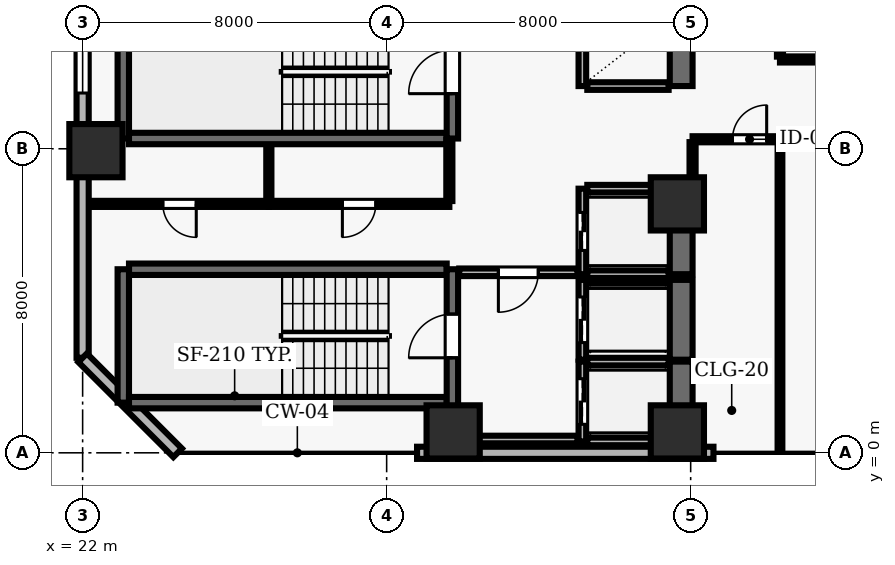
"""IFC4 building model, lengths in metres.
Left out: names, types, materials, properties, quantities, classifications, styles, units other than length and angle.
Written with IfcOpenShell. Run it as: python <this file> out.ifc"""

import sys

from ifc_helpers import new_model, si_unit, direction, frame, frame_2d, origin, origin_2d, place, context, subcontext, project, spatial, rectangle, extrude, element, fill, save


model = new_model("IFC4")
c1 = context("Model", 3, precision=1e-05, world=origin(), true_north=direction((0.0, 1.0)))
c2 = subcontext(c1, "Body", "Model", "MODEL_VIEW")
j1 = project(units=[si_unit("LENGTHUNIT", "METRE"), si_unit("PLANEANGLEUNIT", "RADIAN")], contexts=[c1])
p1 = place(None, origin())
s1 = spatial("IfcSite", under=j1, at=p1, CompositionType="ELEMENT")
p2 = place(p1, origin())
s2 = spatial("IfcBuilding", under=s1, at=p2, CompositionType="ELEMENT")
p3 = place(p2, frame((0.0, 0.0, 70.0)))
s3 = spatial("IfcBuildingStorey", under=s2, at=p3, CompositionType="ELEMENT", Elevation=70.0)
for number, where, z_axis, x_axis in (
    (1, (31.75, 0.55, 0.0), (0.0, 0.0, 1.0), (1.0, 0.0, 0.0)),
    (2, (37.65, 0.55, 0.0), (0.0, 0.0, 1.0), (1.0, 0.0, 0.0)),
    (3, (22.35, 7.95, 0.0), (0.0, 0.0, 1.0), (1.0, 0.0, 0.0)),
    (4, (37.65, 6.55, 0.0), (0.0, 0.0, 1.0), (1.0, 0.0, 0.0)),
):
    element("IfcColumn", number, at=place(p3, frame(where, z_axis=z_axis, x_axis=x_axis)), inside=s3, PredefinedType="COLUMN", context=c2, shape_type="SweptSolid", body=[
        extrude(rectangle(XDim=1.4, YDim=1.4, at=origin_2d()), origin(), (0.0, 0.0, 1.0), 3.9),
    ])
p4 = place(p3, frame((30.8, 0.0, 0.0), z_axis=(0.0, 0.0, 1.0), x_axis=(1.0, 0.0, 0.0)))
e5 = element("IfcWall", 5, at=p4, inside=s3, PredefinedType="SOLIDWALL", context=c2, shape_type="SweptSolid", body=[
    extrude(rectangle(XDim=7.8, YDim=0.32, at=frame_2d((3.9, 0.0))), origin(), (0.0, 0.0, 1.0), 3.69),
])
p5 = place(p3, frame((22.0, 51.5, 0.0), z_axis=(0.0, 0.0, 1.0), x_axis=(0.0, -1.0, 0.0)))
e6 = element("IfcWall", 6, at=p5, inside=s3, PredefinedType="SOLIDWALL", context=c2, shape_type="SweptSolid", body=[
    extrude(rectangle(XDim=49.0, YDim=0.32, at=frame_2d((24.5, 0.0))), origin(), (0.0, 0.0, 1.0), 3.69),
])
p6 = place(p5, frame((12.1, 0.0, 0.0)))
e7 = element("IfcOpeningElement", 7, at=p6, cuts=e6, PredefinedType="OPENING", context=c2, shape_type="SweptSolid", body=[
    extrude(rectangle(XDim=1.0, YDim=2.2, at=frame_2d((0.5, 1.1))), frame((0.0, 0.17, 0.0), z_axis=(0.0, -1.0, 0.0), x_axis=(1.0, 0.0, 0.0)), (0.0, 0.0, 1.0), 0.34),
])
p7 = place(p5, frame((1.522, 0.0, 0.9)))
e8 = element("IfcOpeningElement", 8, at=p7, cuts=e6, PredefinedType="OPENING", context=c2, shape_type="SweptSolid", body=[
    extrude(rectangle(XDim=2.4, YDim=1.6, at=frame_2d((1.2, 0.8))), frame((0.0, 0.17, 0.0), z_axis=(0.0, -1.0, 0.0), x_axis=(1.0, 0.0, 0.0)), (0.0, 0.0, 1.0), 0.34),
])
p8 = place(p5, frame((6.967, 0.0, 0.9)))
e9 = element("IfcOpeningElement", 9, at=p8, cuts=e6, PredefinedType="OPENING", context=c2, shape_type="SweptSolid", body=[
    extrude(rectangle(XDim=2.4, YDim=1.6, at=frame_2d((1.2, 0.8))), frame((0.0, 0.17, 0.0), z_axis=(0.0, -1.0, 0.0), x_axis=(1.0, 0.0, 0.0)), (0.0, 0.0, 1.0), 0.34),
])
p9 = place(p5, frame((17.856, 0.0, 0.9)))
e10 = element("IfcOpeningElement", 10, at=p9, cuts=e6, PredefinedType="OPENING", context=c2, shape_type="SweptSolid", body=[
    extrude(rectangle(XDim=2.4, YDim=1.6, at=frame_2d((1.2, 0.8))), frame((0.0, 0.17, 0.0), z_axis=(0.0, -1.0, 0.0), x_axis=(1.0, 0.0, 0.0)), (0.0, 0.0, 1.0), 0.34),
])
p10 = place(p5, frame((22.4, 0.0, 0.9)))
e11 = element("IfcOpeningElement", 11, at=p10, cuts=e6, PredefinedType="OPENING", context=c2, shape_type="SweptSolid", body=[
    extrude(rectangle(XDim=2.4, YDim=1.6, at=frame_2d((1.2, 0.8))), frame((0.0, 0.17, 0.0), z_axis=(0.0, -1.0, 0.0), x_axis=(1.0, 0.0, 0.0)), (0.0, 0.0, 1.0), 0.34),
])
p11 = place(p5, frame((29.194, 0.0, 0.9)))
e12 = element("IfcOpeningElement", 12, at=p11, cuts=e6, PredefinedType="OPENING", context=c2, shape_type="SweptSolid", body=[
    extrude(rectangle(XDim=2.4, YDim=1.6, at=frame_2d((1.2, 0.8))), frame((0.0, 0.17, 0.0), z_axis=(0.0, -1.0, 0.0), x_axis=(1.0, 0.0, 0.0)), (0.0, 0.0, 1.0), 0.34),
])
p12 = place(p5, frame((33.289, 0.0, 0.9)))
e13 = element("IfcOpeningElement", 13, at=p12, cuts=e6, PredefinedType="OPENING", context=c2, shape_type="SweptSolid", body=[
    extrude(rectangle(XDim=2.4, YDim=1.6, at=frame_2d((1.2, 0.8))), frame((0.0, 0.17, 0.0), z_axis=(0.0, -1.0, 0.0), x_axis=(1.0, 0.0, 0.0)), (0.0, 0.0, 1.0), 0.34),
])
p13 = place(p5, frame((39.633, 0.0, 0.9)))
e14 = element("IfcOpeningElement", 14, at=p13, cuts=e6, PredefinedType="OPENING", context=c2, shape_type="SweptSolid", body=[
    extrude(rectangle(XDim=2.4, YDim=1.6, at=frame_2d((1.2, 0.8))), frame((0.0, 0.17, 0.0), z_axis=(0.0, -1.0, 0.0), x_axis=(1.0, 0.0, 0.0)), (0.0, 0.0, 1.0), 0.34),
])
p14 = place(p3, frame((22.0, 2.5, 0.0), z_axis=(0.0, 0.0, 1.0), x_axis=(0.707106781187, -0.707106781187, 0.0)))
e15 = element("IfcWall", 15, at=p14, inside=s3, PredefinedType="SOLIDWALL", context=c2, shape_type="SweptSolid", body=[
    extrude(rectangle(XDim=3.536, YDim=0.32, at=frame_2d((1.768, 0.0))), origin(), (0.0, 0.0, 1.0), 3.69),
])
p15 = place(p3, frame((31.58, 4.83, 0.0), z_axis=(0.0, 0.0, 1.0), x_axis=(-1.0, 0.0, 0.0)))
e16 = element("IfcWall", 16, at=p15, inside=s3, PredefinedType="SHEAR", context=c2, shape_type="SweptSolid", body=[
    extrude(rectangle(XDim=8.36, YDim=0.3, at=frame_2d((4.18, 0.0))), origin(), (0.0, 0.0, 1.0), 3.69),
])
p16 = place(p3, frame((23.07, 4.83, 0.0), z_axis=(0.0, 0.0, 1.0), x_axis=(0.0, -1.0, 0.0)))
e17 = element("IfcWall", 17, at=p16, inside=s3, PredefinedType="SHEAR", context=c2, shape_type="SweptSolid", body=[
    extrude(rectangle(XDim=3.51, YDim=0.3, at=frame_2d((1.755, 0.0))), origin(), (0.0, 0.0, 1.0), 3.69),
])
p17 = place(p3, frame((23.22, 1.32, 0.0), z_axis=(0.0, 0.0, 1.0), x_axis=(1.0, 0.0, 0.0)))
e18 = element("IfcWall", 18, at=p17, inside=s3, PredefinedType="SHEAR", context=c2, shape_type="SweptSolid", body=[
    extrude(rectangle(XDim=8.36, YDim=0.3, at=frame_2d((4.18, 0.0))), origin(), (0.0, 0.0, 1.0), 3.69),
])
p18 = place(p3, frame((31.73, 0.96, 0.0), z_axis=(0.0, 0.0, 1.0), x_axis=(0.0, 1.0, 0.0)))
e19 = element("IfcWall", 19, at=p18, inside=s3, PredefinedType="SHEAR", context=c2, shape_type="SweptSolid", body=[
    extrude(rectangle(XDim=3.87, YDim=0.3, at=frame_2d((1.935, 0.0))), origin(), (0.0, 0.0, 1.0), 3.69),
])
p19 = place(p18, frame((1.54, 0.0, 0.0)))
e20 = element("IfcOpeningElement", 20, at=p19, cuts=e19, PredefinedType="OPENING", context=c2, shape_type="SweptSolid", body=[
    extrude(rectangle(XDim=1.15, YDim=2.15, at=frame_2d((0.575, 1.075))), frame((0.0, 0.16, 0.0), z_axis=(0.0, -1.0, 0.0), x_axis=(1.0, 0.0, 0.0)), (0.0, 0.0, 1.0), 0.32),
])
p20 = place(p3, frame((23.07, 11.78, 0.0), z_axis=(0.0, 0.0, 1.0), x_axis=(0.0, -1.0, 0.0)))
e21 = element("IfcWall", 21, at=p20, inside=s3, PredefinedType="SHEAR", context=c2, shape_type="SweptSolid", body=[
    extrude(rectangle(XDim=3.51, YDim=0.3, at=frame_2d((1.755, 0.0))), origin(), (0.0, 0.0, 1.0), 3.69),
])
p21 = place(p3, frame((23.22, 8.27, 0.0), z_axis=(0.0, 0.0, 1.0), x_axis=(1.0, 0.0, 0.0)))
e22 = element("IfcWall", 22, at=p21, inside=s3, PredefinedType="SHEAR", context=c2, shape_type="SweptSolid", body=[
    extrude(rectangle(XDim=8.36, YDim=0.3, at=frame_2d((4.18, 0.0))), origin(), (0.0, 0.0, 1.0), 3.69),
])
p22 = place(p3, frame((31.73, 8.27, 0.0), z_axis=(0.0, 0.0, 1.0), x_axis=(0.0, 1.0, 0.0)))
e23 = element("IfcWall", 23, at=p22, inside=s3, PredefinedType="SHEAR", context=c2, shape_type="SweptSolid", body=[
    extrude(rectangle(XDim=3.51, YDim=0.3, at=frame_2d((1.755, 0.0))), origin(), (0.0, 0.0, 1.0), 3.69),
])
p23 = place(p22, frame((1.18, 0.0, 0.0)))
e24 = element("IfcOpeningElement", 24, at=p23, cuts=e23, PredefinedType="OPENING", context=c2, shape_type="SweptSolid", body=[
    extrude(rectangle(XDim=1.15, YDim=2.15, at=frame_2d((0.575, 1.075))), frame((0.0, 0.16, 0.0), z_axis=(0.0, -1.0, 0.0), x_axis=(1.0, 0.0, 0.0)), (0.0, 0.0, 1.0), 0.32),
])
p24 = place(p3, frame((35.15, 2.4, 0.0), z_axis=(0.0, 0.0, 1.0), x_axis=(0.0, -1.0, 0.0)))
e25 = element("IfcWall", 25, at=p24, inside=s3, PredefinedType="SOLIDWALL", context=c2, shape_type="SweptSolid", body=[
    extrude(rectangle(XDim=2.1, YDim=0.2, at=frame_2d((1.05, 0.0))), origin(), (0.0, 0.0, 1.0), 3.69),
])
p25 = place(p24, frame((0.45, 0.0, 0.0)))
e26 = element("IfcOpeningElement", 26, at=p25, cuts=e25, PredefinedType="OPENING", context=c2, shape_type="SweptSolid", body=[
    extrude(rectangle(XDim=1.2, YDim=2.15, at=frame_2d((0.6, 1.075))), frame((0.0, 0.11, 0.0), z_axis=(0.0, -1.0, 0.0), x_axis=(1.0, 0.0, 0.0)), (0.0, 0.0, 1.0), 0.22),
])
p26 = place(p3, frame((37.75, 0.3, 0.0), z_axis=(0.0, 0.0, 1.0), x_axis=(0.0, 1.0, 0.0)))
e27 = element("IfcWall", 27, at=p26, inside=s3, PredefinedType="SHEAR", context=c2, shape_type="SweptSolid", body=[
    extrude(rectangle(XDim=2.1, YDim=0.6, at=frame_2d((1.05, 0.0))), origin(), (0.0, 0.0, 1.0), 3.69),
])
for number, where, z_axis, x_axis in (
    (28, (35.28, 0.3, 0.0), (0.0, 0.0, 1.0), (1.0, 0.0, 0.0)),
    (29, (37.42, 2.4, 0.0), (0.0, 0.0, 1.0), (-1.0, 0.0, 0.0)),
):
    element("IfcWall", number, at=place(p3, frame(where, z_axis=z_axis, x_axis=x_axis)), inside=s3, PredefinedType="SOLIDWALL", context=c2, shape_type="SweptSolid", body=[
        extrude(rectangle(XDim=2.14, YDim=0.2, at=frame_2d((1.07, 0.0))), origin(), (0.0, 0.0, 1.0), 3.69),
    ])
p27 = place(p3, frame((35.15, 4.55, 0.0), z_axis=(0.0, 0.0, 1.0), x_axis=(0.0, -1.0, 0.0)))
e30 = element("IfcWall", 30, at=p27, inside=s3, PredefinedType="SOLIDWALL", context=c2, shape_type="SweptSolid", body=[
    extrude(rectangle(XDim=2.1, YDim=0.2, at=frame_2d((1.05, 0.0))), origin(), (0.0, 0.0, 1.0), 3.69),
])
p28 = place(p27, frame((0.45, 0.0, 0.0)))
e31 = element("IfcOpeningElement", 31, at=p28, cuts=e30, PredefinedType="OPENING", context=c2, shape_type="SweptSolid", body=[
    extrude(rectangle(XDim=1.2, YDim=2.15, at=frame_2d((0.6, 1.075))), frame((0.0, 0.11, 0.0), z_axis=(0.0, -1.0, 0.0), x_axis=(1.0, 0.0, 0.0)), (0.0, 0.0, 1.0), 0.22),
])
p29 = place(p3, frame((37.75, 2.45, 0.0), z_axis=(0.0, 0.0, 1.0), x_axis=(0.0, 1.0, 0.0)))
e32 = element("IfcWall", 32, at=p29, inside=s3, PredefinedType="SHEAR", context=c2, shape_type="SweptSolid", body=[
    extrude(rectangle(XDim=2.1, YDim=0.6, at=frame_2d((1.05, 0.0))), origin(), (0.0, 0.0, 1.0), 3.69),
])
p30 = place(p3, frame((37.42, 4.55, 0.0), z_axis=(0.0, 0.0, 1.0), x_axis=(-1.0, 0.0, 0.0)))
e33 = element("IfcWall", 33, at=p30, inside=s3, PredefinedType="SOLIDWALL", context=c2, shape_type="SweptSolid", body=[
    extrude(rectangle(XDim=2.14, YDim=0.2, at=frame_2d((1.07, 0.0))), origin(), (0.0, 0.0, 1.0), 3.69),
])
p31 = place(p3, frame((35.15, 6.95, 0.0), z_axis=(0.0, 0.0, 1.0), x_axis=(0.0, -1.0, 0.0)))
e34 = element("IfcWall", 34, at=p31, inside=s3, PredefinedType="SOLIDWALL", context=c2, shape_type="SweptSolid", body=[
    extrude(rectangle(XDim=2.25, YDim=0.2, at=frame_2d((1.125, 0.0))), origin(), (0.0, 0.0, 1.0), 3.69),
])
p32 = place(p31, frame((0.625, 0.0, 0.0)))
e35 = element("IfcOpeningElement", 35, at=p32, cuts=e34, PredefinedType="OPENING", context=c2, shape_type="SweptSolid", body=[
    extrude(rectangle(XDim=1.0, YDim=2.1, at=frame_2d((0.5, 1.05))), frame((0.0, 0.11, 0.0), z_axis=(0.0, -1.0, 0.0), x_axis=(1.0, 0.0, 0.0)), (0.0, 0.0, 1.0), 0.22),
])
p33 = place(p3, frame((37.75, 4.7, 0.0), z_axis=(0.0, 0.0, 1.0), x_axis=(0.0, 1.0, 0.0)))
e36 = element("IfcWall", 36, at=p33, inside=s3, PredefinedType="SHEAR", context=c2, shape_type="SweptSolid", body=[
    extrude(rectangle(XDim=2.25, YDim=0.6, at=frame_2d((1.125, 0.0))), origin(), (0.0, 0.0, 1.0), 3.69),
])
for number, where, z_axis, x_axis in (
    (37, (35.28, 4.7, 0.0), (0.0, 0.0, 1.0), (1.0, 0.0, 0.0)),
    (38, (37.42, 6.95, 0.0), (0.0, 0.0, 1.0), (-1.0, 0.0, 0.0)),
):
    element("IfcWall", number, at=place(p3, frame(where, z_axis=z_axis, x_axis=x_axis)), inside=s3, PredefinedType="SOLIDWALL", context=c2, shape_type="SweptSolid", body=[
        extrude(rectangle(XDim=2.14, YDim=0.2, at=frame_2d((1.07, 0.0))), origin(), (0.0, 0.0, 1.0), 3.69),
    ])
p34 = place(p3, frame((35.15, 11.55, 0.0), z_axis=(0.0, 0.0, 1.0), x_axis=(0.0, -1.0, 0.0)))
e39 = element("IfcWall", 39, at=p34, inside=s3, PredefinedType="SOLIDWALL", context=c2, shape_type="SweptSolid", body=[
    extrude(rectangle(XDim=1.9, YDim=0.2, at=frame_2d((0.95, 0.0))), origin(), (0.0, 0.0, 1.0), 3.69),
])
p35 = place(p3, frame((37.75, 9.65, 0.0), z_axis=(0.0, 0.0, 1.0), x_axis=(0.0, 1.0, 0.0)))
e40 = element("IfcWall", 40, at=p35, inside=s3, PredefinedType="SHEAR", context=c2, shape_type="SweptSolid", body=[
    extrude(rectangle(XDim=1.9, YDim=0.6, at=frame_2d((0.95, 0.0))), origin(), (0.0, 0.0, 1.0), 3.69),
])
p36 = place(p3, frame((35.28, 9.65, 0.0), z_axis=(0.0, 0.0, 1.0), x_axis=(1.0, 0.0, 0.0)))
e41 = element("IfcWall", 41, at=p36, inside=s3, PredefinedType="SOLIDWALL", context=c2, shape_type="SweptSolid", body=[
    extrude(rectangle(XDim=2.14, YDim=0.2, at=frame_2d((1.07, 0.0))), origin(), (0.0, 0.0, 1.0), 3.69),
])
p37 = place(p3, frame((26.9, 6.55, 0.0), z_axis=(0.0, 0.0, 1.0), x_axis=(-1.0, 0.0, 0.0)))
e42 = element("IfcWall", 42, at=p37, inside=s3, PredefinedType="PARTITIONING", context=c2, shape_type="SweptSolid", body=[
    extrude(rectangle(XDim=4.7, YDim=0.16, at=frame_2d((2.35, 0.0))), origin(), (0.0, 0.0, 1.0), 3.69),
])
p38 = place(p37, frame((1.91, 0.0, 0.0)))
e43 = element("IfcOpeningElement", 43, at=p38, cuts=e42, PredefinedType="OPENING", context=c2, shape_type="SweptSolid", body=[
    extrude(rectangle(XDim=0.88, YDim=2.1, at=frame_2d((0.44, 1.05))), frame((0.0, 0.09, 0.0), z_axis=(0.0, -1.0, 0.0), x_axis=(1.0, 0.0, 0.0)), (0.0, 0.0, 1.0), 0.18),
])
p39 = place(p3, frame((31.65, 0.35, 0.0), z_axis=(0.0, 0.0, 1.0), x_axis=(1.0, 0.0, 0.0)))
e44 = element("IfcWall", 44, at=p39, inside=s3, PredefinedType="SOLIDWALL", context=c2, shape_type="SweptSolid", body=[
    extrude(rectangle(XDim=3.37, YDim=0.2, at=frame_2d((1.685, 0.0))), origin(), (0.0, 0.0, 1.0), 3.69),
])
p40 = place(p3, frame((31.65, 6.55, 0.0), z_axis=(0.0, 0.0, 1.0), x_axis=(-1.0, 0.0, 0.0)))
e45 = element("IfcWall", 45, at=p40, inside=s3, PredefinedType="PARTITIONING", context=c2, shape_type="SweptSolid", body=[
    extrude(rectangle(XDim=4.75, YDim=0.16, at=frame_2d((2.375, 0.0))), origin(), (0.0, 0.0, 1.0), 3.69),
])
p41 = place(p40, frame((1.935, 0.0, 0.0)))
e46 = element("IfcOpeningElement", 46, at=p41, cuts=e45, PredefinedType="OPENING", context=c2, shape_type="SweptSolid", body=[
    extrude(rectangle(XDim=0.88, YDim=2.1, at=frame_2d((0.44, 1.05))), frame((0.0, 0.09, 0.0), z_axis=(0.0, -1.0, 0.0), x_axis=(1.0, 0.0, 0.0)), (0.0, 0.0, 1.0), 0.18),
])
p42 = place(p3, frame((35.02, 4.75, 0.0), z_axis=(0.0, 0.0, 1.0), x_axis=(-1.0, 0.0, 0.0)))
e47 = element("IfcWall", 47, at=p42, inside=s3, PredefinedType="SOLIDWALL", context=c2, shape_type="SweptSolid", body=[
    extrude(rectangle(XDim=3.11, YDim=0.2, at=frame_2d((1.555, 0.0))), origin(), (0.0, 0.0, 1.0), 3.69),
])
p43 = place(p42, frame((1.03, 0.0, 0.0)))
e48 = element("IfcOpeningElement", 48, at=p43, cuts=e47, PredefinedType="OPENING", context=c2, shape_type="SweptSolid", body=[
    extrude(rectangle(XDim=1.05, YDim=2.15, at=frame_2d((0.525, 1.075))), frame((0.0, 0.11, 0.0), z_axis=(0.0, -1.0, 0.0), x_axis=(1.0, 0.0, 0.0)), (0.0, 0.0, 1.0), 0.22),
])
p44 = place(p3, frame((38.05, 8.25, 0.0), z_axis=(0.0, 0.0, 1.0), x_axis=(1.0, 0.0, 0.0)))
e49 = element("IfcWall", 49, at=p44, inside=s3, PredefinedType="PARTITIONING", context=c2, shape_type="SweptSolid", body=[
    extrude(rectangle(XDim=2.3, YDim=0.16, at=frame_2d((1.15, 0.0))), origin(), (0.0, 0.0, 1.0), 2.995),
])
p45 = place(p44, frame((1.05, 0.0, 0.0)))
e50 = element("IfcOpeningElement", 50, at=p45, cuts=e49, PredefinedType="OPENING", context=c2, shape_type="SweptSolid", body=[
    extrude(rectangle(XDim=0.9, YDim=2.1, at=frame_2d((0.45, 1.05))), frame((0.0, 0.09, 0.0), z_axis=(0.0, -1.0, 0.0), x_axis=(1.0, 0.0, 0.0)), (0.0, 0.0, 1.0), 0.18),
])
p46 = place(p3, frame((40.35, 8.25, 0.0), z_axis=(0.0, 0.0, 1.0), x_axis=(1.0, 0.0, 0.0)))
e51 = element("IfcWall", 51, at=p46, inside=s3, PredefinedType="PARTITIONING", context=c2, shape_type="SweptSolid", body=[
    extrude(rectangle(XDim=12.83, YDim=0.16, at=frame_2d((6.415, 0.0))), origin(), (0.0, 0.0, 1.0), 2.995),
])
p47 = place(p46, frame((7.365, 0.0, 0.0)))
e52 = element("IfcOpeningElement", 52, at=p47, cuts=e51, PredefinedType="OPENING", context=c2, shape_type="SweptSolid", body=[
    extrude(rectangle(XDim=0.9, YDim=2.1, at=frame_2d((0.45, 1.05))), frame((0.0, 0.09, 0.0), z_axis=(0.0, -1.0, 0.0), x_axis=(1.0, 0.0, 0.0)), (0.0, 0.0, 1.0), 0.18),
])
p48 = place(p3, frame((53.18, 10.35, 0.0), z_axis=(0.0, 0.0, 1.0), x_axis=(-1.0, 0.0, 0.0)))
e53 = element("IfcWall", 53, at=p48, inside=s3, PredefinedType="PARTITIONING", context=c2, shape_type="SweptSolid", body=[
    extrude(rectangle(XDim=12.83, YDim=0.16, at=frame_2d((6.415, 0.0))), origin(), (0.0, 0.0, 1.0), 3.227),
])
p49 = place(p48, frame((5.965, 0.0, 0.0)))
e54 = element("IfcOpeningElement", 54, at=p49, cuts=e53, PredefinedType="OPENING", context=c2, shape_type="SweptSolid", body=[
    extrude(rectangle(XDim=0.9, YDim=2.1, at=frame_2d((0.45, 1.05))), frame((0.0, 0.09, 0.0), z_axis=(0.0, -1.0, 0.0), x_axis=(1.0, 0.0, 0.0)), (0.0, 0.0, 1.0), 0.18),
])
p50 = place(p3, frame((26.9, 6.625, 0.0), z_axis=(0.0, 0.0, 1.0), x_axis=(0.0, 1.0, 0.0)))
e55 = element("IfcWall", 55, at=p50, inside=s3, PredefinedType="PARTITIONING", context=c2, shape_type="SweptSolid", body=[
    extrude(rectangle(XDim=1.465, YDim=0.135, at=frame_2d((0.732, 0.0))), origin(), (0.0, 0.0, 1.0), 3.69),
])
p51 = place(p3, frame((31.65, 8.24, 0.0), z_axis=(0.0, 0.0, 1.0), x_axis=(0.0, -1.0, 0.0)))
e56 = element("IfcWall", 56, at=p51, inside=s3, PredefinedType="PARTITIONING", context=c2, shape_type="SweptSolid", body=[
    extrude(rectangle(XDim=1.615, YDim=0.16, at=frame_2d((0.808, 0.0))), origin(), (0.0, 0.0, 1.0), 3.69),
])
p52 = place(p3, frame((38.05, 7.05, 0.0), z_axis=(0.0, 0.0, 1.0), x_axis=(0.0, 1.0, 0.0)))
e57 = element("IfcWall", 57, at=p52, inside=s3, PredefinedType="PARTITIONING", context=c2, shape_type="SweptSolid", body=[
    extrude(rectangle(XDim=1.125, YDim=0.16, at=frame_2d((0.562, 0.0))), origin(), (0.0, 0.0, 1.0), 2.995),
])
p53 = place(p3, frame((40.35, 0.09, 0.0), z_axis=(0.0, 0.0, 1.0), x_axis=(0.0, 1.0, 0.0)))
e58 = element("IfcWall", 58, at=p53, inside=s3, PredefinedType="PARTITIONING", context=c2, shape_type="SweptSolid", body=[
    extrude(rectangle(XDim=8.085, YDim=0.125, at=frame_2d((4.042, 0.0))), origin(), (0.0, 0.0, 1.0), 3.69),
])
p54 = place(p3, frame((40.35, 10.425, 0.0), z_axis=(0.0, 0.0, 1.0), x_axis=(0.0, 1.0, 0.0)))
e59 = element("IfcWall", 59, at=p54, inside=s3, PredefinedType="PARTITIONING", context=c2, shape_type="SweptSolid", body=[
    extrude(rectangle(XDim=5.5, YDim=0.16, at=frame_2d((2.75, 0.0))), origin(), (0.0, 0.0, 1.0), 3.227),
])
p55 = place(p13, origin())
e60 = element("IfcWindow", 60, at=p55, inside=s3, PartitioningType="SINGLE_PANEL", PredefinedType="WINDOW", context=c2, shape_type="SweptSolid", body=[
    extrude(rectangle(XDim=2.4, YDim=1.6, at=frame_2d((1.2, 0.8))), frame((0.0, 0.03, 0.0), z_axis=(0.0, -1.0, 0.0), x_axis=(1.0, 0.0, 0.0)), (0.0, 0.0, 1.0), 0.06),
])
fill(e14, e60)
p56 = place(p19, origin())
e61 = element("IfcDoor", 61, at=p56, inside=s3, OperationType="SINGLE_SWING_LEFT", PredefinedType="DOOR", context=c2, shape_type="SweptSolid", body=[
    extrude(rectangle(XDim=1.15, YDim=2.15, at=frame_2d((0.575, 1.075))), frame((0.0, 0.025, 0.0), z_axis=(0.0, -1.0, 0.0), x_axis=(1.0, 0.0, 0.0)), (0.0, 0.0, 1.0), 0.05),
])
fill(e20, e61)
p57 = place(p23, origin())
e62 = element("IfcDoor", 62, at=p57, inside=s3, OperationType="SINGLE_SWING_LEFT", PredefinedType="DOOR", context=c2, shape_type="SweptSolid", body=[
    extrude(rectangle(XDim=1.15, YDim=2.15, at=frame_2d((0.575, 1.075))), frame((0.0, 0.025, 0.0), z_axis=(0.0, -1.0, 0.0), x_axis=(1.0, 0.0, 0.0)), (0.0, 0.0, 1.0), 0.05),
])
fill(e24, e62)
p58 = place(p25, origin())
e63 = element("IfcDoor", 63, at=p58, inside=s3, OperationType="DOUBLE_DOOR_SLIDING", PredefinedType="DOOR", context=c2, shape_type="SweptSolid", body=[
    extrude(rectangle(XDim=1.2, YDim=2.15, at=frame_2d((0.6, 1.075))), frame((0.0, 0.025, 0.0), z_axis=(0.0, -1.0, 0.0), x_axis=(1.0, 0.0, 0.0)), (0.0, 0.0, 1.0), 0.05),
])
fill(e26, e63)
p59 = place(p28, origin())
e64 = element("IfcDoor", 64, at=p59, inside=s3, OperationType="DOUBLE_DOOR_SLIDING", PredefinedType="DOOR", context=c2, shape_type="SweptSolid", body=[
    extrude(rectangle(XDim=1.2, YDim=2.15, at=frame_2d((0.6, 1.075))), frame((0.0, 0.025, 0.0), z_axis=(0.0, -1.0, 0.0), x_axis=(1.0, 0.0, 0.0)), (0.0, 0.0, 1.0), 0.05),
])
fill(e31, e64)
p60 = place(p32, origin())
e65 = element("IfcDoor", 65, at=p60, inside=s3, OperationType="DOUBLE_DOOR_SLIDING", PredefinedType="DOOR", context=c2, shape_type="SweptSolid", body=[
    extrude(rectangle(XDim=1.0, YDim=2.1, at=frame_2d((0.5, 1.05))), frame((0.0, 0.025, 0.0), z_axis=(0.0, -1.0, 0.0), x_axis=(1.0, 0.0, 0.0)), (0.0, 0.0, 1.0), 0.05),
])
fill(e35, e65)
p61 = place(p43, origin())
e66 = element("IfcDoor", 66, at=p61, inside=s3, OperationType="SINGLE_SWING_RIGHT", PredefinedType="DOOR", context=c2, shape_type="SweptSolid", body=[
    extrude(rectangle(XDim=1.05, YDim=2.15, at=frame_2d((0.525, 1.075))), frame((0.0, 0.025, 0.0), z_axis=(0.0, -1.0, 0.0), x_axis=(1.0, 0.0, 0.0)), (0.0, 0.0, 1.0), 0.05),
])
fill(e48, e66)
p62 = place(p38, origin())
e67 = element("IfcDoor", 67, at=p62, inside=s3, OperationType="SINGLE_SWING_LEFT", PredefinedType="DOOR", context=c2, shape_type="SweptSolid", body=[
    extrude(rectangle(XDim=0.88, YDim=2.1, at=frame_2d((0.44, 1.05))), frame((0.0, 0.025, 0.0), z_axis=(0.0, -1.0, 0.0), x_axis=(1.0, 0.0, 0.0)), (0.0, 0.0, 1.0), 0.05),
])
fill(e43, e67)
p63 = place(p41, origin())
e68 = element("IfcDoor", 68, at=p63, inside=s3, OperationType="SINGLE_SWING_RIGHT", PredefinedType="DOOR", context=c2, shape_type="SweptSolid", body=[
    extrude(rectangle(XDim=0.88, YDim=2.1, at=frame_2d((0.44, 1.05))), frame((0.0, 0.025, 0.0), z_axis=(0.0, -1.0, 0.0), x_axis=(1.0, 0.0, 0.0)), (0.0, 0.0, 1.0), 0.05),
])
fill(e46, e68)
p64 = place(p45, origin())
e69 = element("IfcDoor", 69, at=p64, inside=s3, OperationType="SINGLE_SWING_RIGHT", PredefinedType="DOOR", context=c2, shape_type="SweptSolid", body=[
    extrude(rectangle(XDim=0.9, YDim=2.1, at=frame_2d((0.45, 1.05))), frame((0.0, 0.025, 0.0), z_axis=(0.0, -1.0, 0.0), x_axis=(1.0, 0.0, 0.0)), (0.0, 0.0, 1.0), 0.05),
])
fill(e50, e69)
save(model, sys.argv[1])
